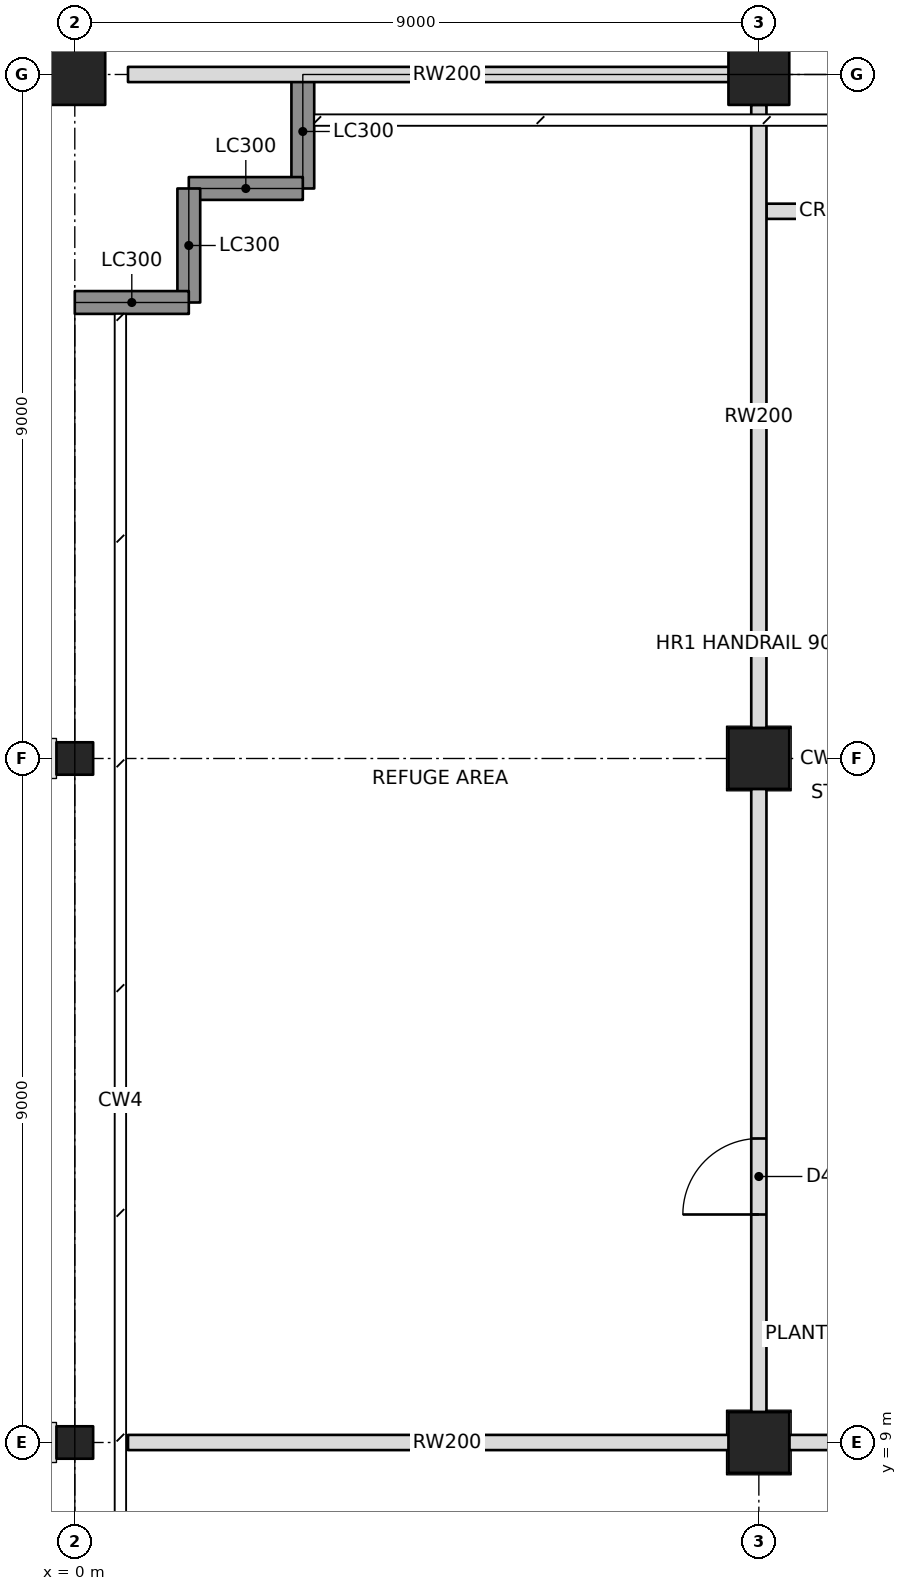
"""IFC4 building model, lengths in metres.
Left out: names, types, materials, properties, quantities, classifications, styles, units other than length and angle.
Written with IfcOpenShell. Run it as: python <this file> out.ifc"""

import sys

from ifc_helpers import new_model, si_unit, direction, frame, frame_2d, origin, origin_2d, place, context, subcontext, project, spatial, rectangle, hollow_rectangle, i_section, extrude, element, fill, save


model = new_model("IFC4")
c1 = context("Model", 3, precision=1e-05, world=origin(), true_north=direction((0.0, 1.0)))
c2 = subcontext(c1, "Body", "Model", "MODEL_VIEW")
j1 = project(units=[si_unit("LENGTHUNIT", "METRE"), si_unit("PLANEANGLEUNIT", "RADIAN")], contexts=[c1])
p1 = place(None, origin())
s1 = spatial("IfcSite", under=j1, at=p1, CompositionType="ELEMENT")
p2 = place(p1, origin())
s2 = spatial("IfcBuilding", under=s1, at=p2, CompositionType="ELEMENT")
p3 = place(p2, frame((0.0, 0.0, 221.6)))
s3 = spatial("IfcBuildingStorey", under=s2, at=p3, CompositionType="ELEMENT", Elevation=221.6)
for number, where, z_axis, x_axis in (
    (1, (0.0, 9.0, 0.0), (0.0, 0.0, 1.0), (0.0, 1.0, 0.0)),
    (2, (0.0, 18.0, 0.0), (0.0, 0.0, 1.0), (0.0, 1.0, 0.0)),
):
    element("IfcColumn", number, at=place(p3, frame(where, z_axis=z_axis, x_axis=x_axis)), inside=s3, PredefinedType="COLUMN", context=c2, shape_type="SweptSolid", body=[
        extrude(i_section(OverallWidth=0.427, OverallDepth=0.483, WebThickness=0.051, FlangeThickness=0.082, at=origin_2d()), origin(), (0.0, 0.0, 1.0), 5.0),
    ])
p4 = place(p3, frame((0.0, 27.0, 0.0), z_axis=(0.0, 0.0, 1.0), x_axis=(0.0, 1.0, 0.0)))
e3 = element("IfcColumn", 3, at=p4, inside=s3, PredefinedType="COLUMN", context=c2, shape_type="SweptSolid", body=[
    extrude(hollow_rectangle(XDim=0.8, YDim=0.8, WallThickness=0.06, at=origin_2d()), origin(), (0.0, 0.0, 1.0), 5.0),
])
for number, where, z_axis, x_axis in (
    (4, (9.0, 9.0, 0.0), (0.0, 0.0, 1.0), (1.0, 0.0, 0.0)),
    (5, (9.0, 18.0, 0.0), (0.0, 0.0, 1.0), (1.0, 0.0, 0.0)),
):
    element("IfcColumn", number, at=place(p3, frame(where, z_axis=z_axis, x_axis=x_axis)), inside=s3, PredefinedType="COLUMN", context=c2, shape_type="SweptSolid", body=[
        extrude(hollow_rectangle(XDim=0.8, YDim=0.8, WallThickness=0.1, at=origin_2d()), origin(), (0.0, 0.0, 1.0), 5.0),
    ])
p5 = place(p3, frame((9.0, 27.0, 0.0), z_axis=(0.0, 0.0, 1.0), x_axis=(1.0, 0.0, 0.0)))
e6 = element("IfcColumn", 6, at=p5, inside=s3, PredefinedType="COLUMN", context=c2, shape_type="SweptSolid", body=[
    extrude(hollow_rectangle(XDim=0.8, YDim=0.8, WallThickness=0.06, at=origin_2d()), origin(), (0.0, 0.0, 1.0), 5.0),
])
p6 = place(p3, frame((3.0, 27.0, 0.0), z_axis=(0.0, 0.0, 1.0), x_axis=(0.0, -1.0, 0.0)))
e7 = element("IfcWall", 7, at=p6, inside=s3, PredefinedType="SOLIDWALL", context=c2, shape_type="SweptSolid", body=[
    extrude(rectangle(XDim=1.5, YDim=0.3, at=frame_2d((0.75, 0.0))), origin(), (0.0, 0.0, 1.0), 3.852),
])
for number, where, z_axis, x_axis in (
    (8, (3.0, 25.5, 0.0), (0.0, 0.0, 1.0), (-1.0, 0.0, 0.0)),
    (9, (1.5, 25.5, 0.0), (0.0, 0.0, 1.0), (0.0, -1.0, 0.0)),
):
    element("IfcWall", number, at=place(p3, frame(where, z_axis=z_axis, x_axis=x_axis)), inside=s3, PredefinedType="SOLIDWALL", context=c2, shape_type="SweptSolid", body=[
        extrude(rectangle(XDim=1.5, YDim=0.3, at=frame_2d((0.75, 0.0))), origin(), (0.0, 0.0, 1.0), 4.8),
    ])
p7 = place(p3, frame((1.5, 24.0, 0.0), z_axis=(0.0, 0.0, 1.0), x_axis=(-1.0, 0.0, 0.0)))
e10 = element("IfcWall", 10, at=p7, inside=s3, PredefinedType="SOLIDWALL", context=c2, shape_type="SweptSolid", body=[
    extrude(rectangle(XDim=1.5, YDim=0.3, at=frame_2d((0.75, 0.0))), origin(), (0.0, 0.0, 1.0), 3.852),
])
p8 = place(p3, frame((9.0, 9.4, 0.0), z_axis=(0.0, 0.0, 1.0), x_axis=(0.0, 1.0, 0.0)))
e11 = element("IfcWall", 11, at=p8, inside=s3, PredefinedType="PARTITIONING", context=c2, shape_type="SweptSolid", body=[
    extrude(rectangle(XDim=8.2, YDim=0.2, at=frame_2d((4.1, 0.0))), origin(), (0.0, 0.0, 1.0), 4.005),
])
p9 = place(p8, frame((2.6, 0.0, 0.0)))
e12 = element("IfcOpeningElement", 12, at=p9, cuts=e11, PredefinedType="OPENING", context=c2, shape_type="SweptSolid", body=[
    extrude(rectangle(XDim=1.0, YDim=2.1, at=frame_2d((0.5, 1.05))), frame((0.0, 0.11, 0.0), z_axis=(0.0, -1.0, 0.0), x_axis=(1.0, 0.0, 0.0)), (0.0, 0.0, 1.0), 0.22),
])
p10 = place(p3, frame((9.0, 18.4, 0.0), z_axis=(0.0, 0.0, 1.0), x_axis=(0.0, 1.0, 0.0)))
e13 = element("IfcWall", 13, at=p10, inside=s3, PredefinedType="PARTITIONING", context=c2, shape_type="SweptSolid", body=[
    extrude(rectangle(XDim=8.2, YDim=0.2, at=frame_2d((4.1, 0.0))), origin(), (0.0, 0.0, 1.0), 4.005),
])
p11 = place(p3, frame((0.7, 9.0, 0.0), z_axis=(0.0, 0.0, 1.0), x_axis=(1.0, 0.0, 0.0)))
e14 = element("IfcWall", 14, at=p11, inside=s3, PredefinedType="PARTITIONING", context=c2, shape_type="SweptSolid", body=[
    extrude(rectangle(XDim=8.4, YDim=0.2, at=frame_2d((4.2, 0.0))), origin(), (0.0, 0.0, 1.0), 4.005),
])
p12 = place(p3, frame((0.7, 27.0, 0.0), z_axis=(0.0, 0.0, 1.0), x_axis=(1.0, 0.0, 0.0)))
e15 = element("IfcWall", 15, at=p12, inside=s3, PredefinedType="PARTITIONING", context=c2, shape_type="SweptSolid", body=[
    extrude(rectangle(XDim=8.4, YDim=0.2, at=frame_2d((4.2, 0.0))), origin(), (0.0, 0.0, 1.0), 3.853),
])
p13 = place(p3, frame((9.4, 9.0, 0.0), z_axis=(0.0, 0.0, 1.0), x_axis=(1.0, 0.0, 0.0)))
e16 = element("IfcWall", 16, at=p13, inside=s3, PredefinedType="PARTITIONING", context=c2, shape_type="SweptSolid", body=[
    extrude(rectangle(XDim=8.2, YDim=0.2, at=frame_2d((4.1, 0.0))), origin(), (0.0, 0.0, 1.0), 4.005),
])
p14 = place(p13, frame((1.6, 0.0, 0.0)))
e17 = element("IfcOpeningElement", 17, at=p14, cuts=e16, PredefinedType="OPENING", context=c2, shape_type="SweptSolid", body=[
    extrude(rectangle(XDim=1.0, YDim=2.1, at=frame_2d((0.5, 1.05))), frame((0.0, 0.11, 0.0), z_axis=(0.0, -1.0, 0.0), x_axis=(1.0, 0.0, 0.0)), (0.0, 0.0, 1.0), 0.22),
])
p15 = place(p3, frame((9.1, 25.2, 0.0), z_axis=(0.0, 0.0, 1.0), x_axis=(1.0, 0.0, 0.0)))
e18 = element("IfcWall", 18, at=p15, inside=s3, PredefinedType="PARTITIONING", context=c2, shape_type="SweptSolid", body=[
    extrude(rectangle(XDim=1.7, YDim=0.2, at=frame_2d((0.85, 0.0))), origin(), (0.0, 0.0, 1.0), 4.004),
])
p16 = place(p9, origin())
e19 = element("IfcDoor", 19, at=p16, inside=s3, OperationType="SINGLE_SWING_LEFT", PredefinedType="DOOR", context=c2, shape_type="SweptSolid", body=[
    extrude(rectangle(XDim=1.0, YDim=2.1, at=frame_2d((0.5, 1.05))), frame((0.0, 0.025, 0.0), z_axis=(0.0, -1.0, 0.0), x_axis=(1.0, 0.0, 0.0)), (0.0, 0.0, 1.0), 0.05),
])
fill(e12, e19)
save(model, sys.argv[1])
